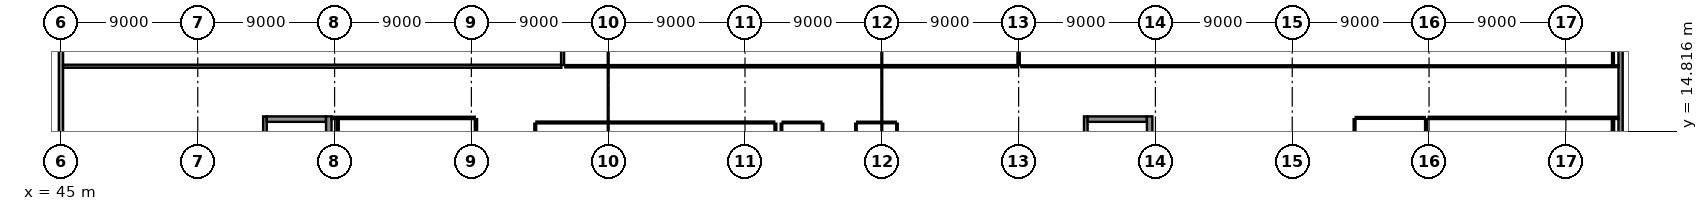
"""IFC4 building model, lengths in metres.
Left out: names, types, materials, properties, quantities, classifications, styles, units other than length and angle.
Written with IfcOpenShell. Run it as: python <this file> out.ifc"""

import sys

from ifc_helpers import new_model, si_unit, direction, frame, frame_2d, origin, place, context, subcontext, project, spatial, rectangle, extrude, element, fill, save


model = new_model("IFC4")
c1 = context("Model", 3, precision=1e-05, world=origin(), true_north=direction((0.0, 1.0)))
c2 = subcontext(c1, "Body", "Model", "MODEL_VIEW")
j1 = project(units=[si_unit("LENGTHUNIT", "METRE"), si_unit("PLANEANGLEUNIT", "RADIAN")], contexts=[c1])
p1 = place(None, origin())
s1 = spatial("IfcSite", under=j1, at=p1, CompositionType="ELEMENT")
p2 = place(p1, origin())
s2 = spatial("IfcBuilding", under=s1, at=p2, CompositionType="ELEMENT")
p3 = place(p2, frame((0.0, 0.0, 23.4)))
s3 = spatial("IfcBuildingStorey", under=s2, at=p3, CompositionType="ELEMENT", Elevation=23.4)
p4 = place(p3, frame((45.0, 23.677, 0.0), z_axis=(0.0, 0.0, 1.0), x_axis=(0.0, -1.0, 0.0)))
e1 = element("IfcWall", 1, at=p4, inside=s3, PredefinedType="SOLIDWALL", context=c2, shape_type="SweptSolid", body=[
    extrude(rectangle(XDim=11.529, YDim=0.28, at=frame_2d((5.765, 0.0))), origin(), (0.0, 0.0, 1.0), 3.155),
])
p5 = place(p4, frame((2.809, 0.0, 0.9)))
e2 = element("IfcOpeningElement", 2, at=p5, cuts=e1, PredefinedType="OPENING", context=c2, shape_type="SweptSolid", body=[
    extrude(rectangle(XDim=1.3, YDim=1.3, at=frame_2d((0.65, 0.65))), frame((0.0, 0.155, 0.0), z_axis=(0.0, -1.0, 0.0), x_axis=(1.0, 0.0, 0.0)), (0.0, 0.0, 1.0), 0.31),
])
p6 = place(p4, frame((8.117, 0.0, 0.9)))
e3 = element("IfcOpeningElement", 3, at=p6, cuts=e1, PredefinedType="OPENING", context=c2, shape_type="SweptSolid", body=[
    extrude(rectangle(XDim=1.3, YDim=1.3, at=frame_2d((0.65, 0.65))), frame((0.0, 0.155, 0.0), z_axis=(0.0, -1.0, 0.0), x_axis=(1.0, 0.0, 0.0)), (0.0, 0.0, 1.0), 0.31),
])
p7 = place(p3, frame((147.6, 11.99, 0.0), z_axis=(0.0, 0.0, 1.0), x_axis=(0.0, 1.0, 0.0)))
e4 = element("IfcWall", 4, at=p7, inside=s3, PredefinedType="SOLIDWALL", context=c2, shape_type="SweptSolid", body=[
    extrude(rectangle(XDim=12.05, YDim=0.28, at=frame_2d((6.025, 0.0))), origin(), (0.0, 0.0, 1.0), 3.055),
])
p8 = place(p7, frame((2.17, 0.0, 0.9)))
e5 = element("IfcOpeningElement", 5, at=p8, cuts=e4, PredefinedType="OPENING", context=c2, shape_type="SweptSolid", body=[
    extrude(rectangle(XDim=1.3, YDim=1.3, at=frame_2d((0.65, 0.65))), frame((0.0, 0.155, 0.0), z_axis=(0.0, -1.0, 0.0), x_axis=(1.0, 0.0, 0.0)), (0.0, 0.0, 1.0), 0.31),
])
p9 = place(p7, frame((7.785, 0.0, 0.9)))
e6 = element("IfcOpeningElement", 6, at=p9, cuts=e4, PredefinedType="OPENING", context=c2, shape_type="SweptSolid", body=[
    extrude(rectangle(XDim=1.3, YDim=1.3, at=frame_2d((0.65, 0.65))), frame((0.0, 0.155, 0.0), z_axis=(0.0, -1.0, 0.0), x_axis=(1.0, 0.0, 0.0)), (0.0, 0.0, 1.0), 0.31),
])
p10 = place(p3, frame((58.42, 13.04, 0.0), z_axis=(0.0, 0.0, 1.0), x_axis=(0.0, 1.0, 0.0)))
e7 = element("IfcWall", 7, at=p10, inside=s3, PredefinedType="SHEAR", context=c2, shape_type="SweptSolid", body=[
    extrude(rectangle(XDim=2.76, YDim=0.24, at=frame_2d((1.38, 0.0))), origin(), (0.0, 0.0, 1.0), 3.66),
])
p11 = place(p3, frame((58.54, 15.62, 0.0), z_axis=(0.0, 0.0, 1.0), x_axis=(1.0, 0.0, 0.0)))
e8 = element("IfcWall", 8, at=p11, inside=s3, PredefinedType="SHEAR", context=c2, shape_type="SweptSolid", body=[
    extrude(rectangle(XDim=3.9, YDim=0.36, at=frame_2d((1.95, 0.0))), origin(), (0.0, 0.0, 1.0), 3.66),
])
p12 = place(p11, frame((1.15, 0.0, 0.0)))
e9 = element("IfcOpeningElement", 9, at=p12, cuts=e8, PredefinedType="OPENING", context=c2, shape_type="SweptSolid", body=[
    extrude(rectangle(XDim=1.6, YDim=2.25, at=frame_2d((0.8, 1.125))), frame((0.0, 0.195, 0.0), z_axis=(0.0, -1.0, 0.0), x_axis=(1.0, 0.0, 0.0)), (0.0, 0.0, 1.0), 0.39),
])
p13 = place(p3, frame((62.62, 6.76, 0.0), z_axis=(0.0, 0.0, 1.0), x_axis=(0.0, 1.0, 0.0)))
e10 = element("IfcWall", 10, at=p13, inside=s3, PredefinedType="SHEAR", context=c2, shape_type="SweptSolid", body=[
    extrude(rectangle(XDim=9.04, YDim=0.36, at=frame_2d((4.52, 0.0))), origin(), (0.0, 0.0, 1.0), 3.66),
])
p14 = place(p3, frame((112.42, 13.04, 0.0), z_axis=(0.0, 0.0, 1.0), x_axis=(0.0, 1.0, 0.0)))
e11 = element("IfcWall", 11, at=p14, inside=s3, PredefinedType="SHEAR", context=c2, shape_type="SweptSolid", body=[
    extrude(rectangle(XDim=2.76, YDim=0.24, at=frame_2d((1.38, 0.0))), origin(), (0.0, 0.0, 1.0), 3.66),
])
p15 = place(p3, frame((112.54, 15.62, 0.0), z_axis=(0.0, 0.0, 1.0), x_axis=(1.0, 0.0, 0.0)))
e12 = element("IfcWall", 12, at=p15, inside=s3, PredefinedType="SHEAR", context=c2, shape_type="SweptSolid", body=[
    extrude(rectangle(XDim=3.9, YDim=0.36, at=frame_2d((1.95, 0.0))), origin(), (0.0, 0.0, 1.0), 3.66),
])
p16 = place(p15, frame((1.15, 0.0, 0.0)))
e13 = element("IfcOpeningElement", 13, at=p16, cuts=e12, PredefinedType="OPENING", context=c2, shape_type="SweptSolid", body=[
    extrude(rectangle(XDim=1.6, YDim=2.25, at=frame_2d((0.8, 1.125))), frame((0.0, 0.195, 0.0), z_axis=(0.0, -1.0, 0.0), x_axis=(1.0, 0.0, 0.0)), (0.0, 0.0, 1.0), 0.39),
])
p17 = place(p3, frame((116.62, 6.76, 0.0), z_axis=(0.0, 0.0, 1.0), x_axis=(0.0, 1.0, 0.0)))
e14 = element("IfcWall", 14, at=p17, inside=s3, PredefinedType="SHEAR", context=c2, shape_type="SweptSolid", body=[
    extrude(rectangle(XDim=9.04, YDim=0.36, at=frame_2d((4.52, 0.0))), origin(), (0.0, 0.0, 1.0), 3.66),
])
p18 = place(p3, frame((63.2, 12.57, 0.0), z_axis=(0.0, 0.0, 1.0), x_axis=(0.0, 1.0, 0.0)))
e15 = element("IfcWall", 15, at=p18, inside=s3, PredefinedType="PARTITIONING", context=c2, shape_type="SweptSolid", body=[
    extrude(rectangle(XDim=3.05, YDim=0.15, at=frame_2d((1.525, 0.0))), origin(), (0.0, 0.0, 1.0), 3.365),
])
p19 = place(p3, frame((62.795, 15.7, 0.0), z_axis=(0.0, 0.0, 1.0), x_axis=(1.0, 0.0, 0.0)))
e16 = element("IfcWall", 16, at=p19, inside=s3, PredefinedType="PARTITIONING", context=c2, shape_type="SweptSolid", body=[
    extrude(rectangle(XDim=9.425, YDim=0.15, at=frame_2d((4.712, 0.0))), origin(), (0.0, 0.0, 1.0), 3.64),
])
p20 = place(p19, frame((4.187, 0.0, 0.0)))
e17 = element("IfcOpeningElement", 17, at=p20, cuts=e16, PredefinedType="OPENING", context=c2, shape_type="SweptSolid", body=[
    extrude(rectangle(XDim=1.05, YDim=2.25, at=frame_2d((0.525, 1.125))), frame((0.0, 0.09, 0.0), z_axis=(0.0, -1.0, 0.0), x_axis=(1.0, 0.0, 0.0)), (0.0, 0.0, 1.0), 0.18),
])
p21 = place(p3, frame((72.3, 15.62, 0.0), z_axis=(0.0, 0.0, 1.0), x_axis=(0.0, -1.0, 0.0)))
e18 = element("IfcWall", 18, at=p21, inside=s3, PredefinedType="PARTITIONING", context=c2, shape_type="SweptSolid", body=[
    extrude(rectangle(XDim=3.04, YDim=0.15, at=frame_2d((1.52, 0.0))), origin(), (0.0, 0.0, 1.0), 3.64),
])
p22 = place(p3, frame((78.0, 23.865, 0.0), z_axis=(0.0, 0.0, 1.0), x_axis=(0.0, -1.0, 0.0)))
e19 = element("IfcWall", 19, at=p22, inside=s3, PredefinedType="PARTITIONING", context=c2, shape_type="SweptSolid", body=[
    extrude(rectangle(XDim=4.685, YDim=0.2, at=frame_2d((2.343, 0.0))), origin(), (0.0, 0.0, 1.0), 3.555),
])
p23 = place(p3, frame((77.92, 19.1, 0.0), z_axis=(0.0, 0.0, 1.0), x_axis=(-1.0, 0.0, 0.0)))
e20 = element("IfcWall", 20, at=p23, inside=s3, PredefinedType="PARTITIONING", context=c2, shape_type="SweptSolid", body=[
    extrude(rectangle(XDim=32.785, YDim=0.2, at=frame_2d((16.393, 0.0))), origin(), (0.0, 0.0, 1.0), 3.64),
])
p24 = place(p23, frame((15.442, 0.0, 0.0)))
e21 = element("IfcOpeningElement", 21, at=p24, cuts=e20, PredefinedType="OPENING", context=c2, shape_type="SweptSolid", body=[
    extrude(rectangle(XDim=1.9, YDim=2.5, at=frame_2d((0.95, 1.25))), frame((0.0, 0.115, 0.0), z_axis=(0.0, -1.0, 0.0), x_axis=(1.0, 0.0, 0.0)), (0.0, 0.0, 1.0), 0.23),
])
p25 = place(p3, frame((108.0, 23.52, 0.0), z_axis=(0.0, 0.0, 1.0), x_axis=(0.0, -1.0, 0.0)))
e22 = element("IfcWall", 22, at=p25, inside=s3, PredefinedType="PARTITIONING", context=c2, shape_type="SweptSolid", body=[
    extrude(rectangle(XDim=4.34, YDim=0.15, at=frame_2d((2.17, 0.0))), origin(), (0.0, 0.0, 1.0), 3.405),
])
p26 = place(p3, frame((107.92, 19.1, 0.0), z_axis=(0.0, 0.0, 1.0), x_axis=(-1.0, 0.0, 0.0)))
e23 = element("IfcWall", 23, at=p26, inside=s3, PredefinedType="PARTITIONING", context=c2, shape_type="SweptSolid", body=[
    extrude(rectangle(XDim=29.74, YDim=0.15, at=frame_2d((14.87, 0.0))), origin(), (0.0, 0.0, 1.0), 3.64),
])
p27 = place(p26, frame((14.345, 0.0, 0.0)))
e24 = element("IfcOpeningElement", 24, at=p27, cuts=e23, PredefinedType="OPENING", context=c2, shape_type="SweptSolid", body=[
    extrude(rectangle(XDim=1.05, YDim=2.25, at=frame_2d((0.525, 1.125))), frame((0.0, 0.09, 0.0), z_axis=(0.0, -1.0, 0.0), x_axis=(1.0, 0.0, 0.0)), (0.0, 0.0, 1.0), 0.18),
])
p28 = place(p3, frame((147.465, 19.1, 0.0), z_axis=(0.0, 0.0, 1.0), x_axis=(-1.0, 0.0, 0.0)))
e25 = element("IfcWall", 25, at=p28, inside=s3, PredefinedType="PARTITIONING", context=c2, shape_type="SweptSolid", body=[
    extrude(rectangle(XDim=39.285, YDim=0.12, at=frame_2d((19.643, 0.0))), origin(), (0.0, 0.0, 1.0), 3.64),
])
p29 = place(p28, frame((19.192, 0.0, 0.0)))
e26 = element("IfcOpeningElement", 26, at=p29, cuts=e25, PredefinedType="OPENING", context=c2, shape_type="SweptSolid", body=[
    extrude(rectangle(XDim=0.9, YDim=2.1, at=frame_2d((0.45, 1.05))), frame((0.0, 0.075, 0.0), z_axis=(0.0, -1.0, 0.0), x_axis=(1.0, 0.0, 0.0)), (0.0, 0.0, 1.0), 0.15),
])
p30 = place(p3, frame((147.1, 23.545, 0.0), z_axis=(0.0, 0.0, 1.0), x_axis=(0.0, -1.0, 0.0)))
e27 = element("IfcWall", 27, at=p30, inside=s3, PredefinedType="PARTITIONING", context=c2, shape_type="SweptSolid", body=[
    extrude(rectangle(XDim=4.39, YDim=0.12, at=frame_2d((2.195, 0.0))), origin(), (0.0, 0.0, 1.0), 3.64),
])
p31 = place(p3, frame((134.8, 15.62, 0.0), z_axis=(0.0, 0.0, 1.0), x_axis=(0.0, -1.0, 0.0)))
e28 = element("IfcWall", 28, at=p31, inside=s3, PredefinedType="PARTITIONING", context=c2, shape_type="SweptSolid", body=[
    extrude(rectangle(XDim=3.94, YDim=0.12, at=frame_2d((1.97, 0.0))), origin(), (0.0, 0.0, 1.0), 3.285),
])
p32 = place(p3, frame((130.1, 11.68, 0.0), z_axis=(0.0, 0.0, 1.0), x_axis=(0.0, 1.0, 0.0)))
e29 = element("IfcWall", 29, at=p32, inside=s3, PredefinedType="PARTITIONING", context=c2, shape_type="SweptSolid", body=[
    extrude(rectangle(XDim=3.94, YDim=0.12, at=frame_2d((1.97, 0.0))), origin(), (0.0, 0.0, 1.0), 3.64),
])
p33 = place(p3, frame((130.18, 15.7, 0.0), z_axis=(0.0, 0.0, 1.0), x_axis=(1.0, 0.0, 0.0)))
e30 = element("IfcWall", 30, at=p33, inside=s3, PredefinedType="PARTITIONING", context=c2, shape_type="SweptSolid", body=[
    extrude(rectangle(XDim=4.54, YDim=0.12, at=frame_2d((2.27, 0.0))), origin(), (0.0, 0.0, 1.0), 3.64),
])
p34 = place(p33, frame((1.795, 0.0, 0.0)))
e31 = element("IfcOpeningElement", 31, at=p34, cuts=e30, PredefinedType="OPENING", context=c2, shape_type="SweptSolid", body=[
    extrude(rectangle(XDim=0.95, YDim=2.15, at=frame_2d((0.475, 1.075))), frame((0.0, 0.075, 0.0), z_axis=(0.0, -1.0, 0.0), x_axis=(1.0, 0.0, 0.0)), (0.0, 0.0, 1.0), 0.15),
])
p35 = place(p3, frame((134.98, 15.7, 0.0), z_axis=(0.0, 0.0, 1.0), x_axis=(1.0, 0.0, 0.0)))
e32 = element("IfcWall", 32, at=p35, inside=s3, PredefinedType="PARTITIONING", context=c2, shape_type="SweptSolid", body=[
    extrude(rectangle(XDim=12.485, YDim=0.15, at=frame_2d((6.243, 0.0))), origin(), (0.0, 0.0, 1.0), 3.64),
])
p36 = place(p35, frame((5.718, 0.0, 0.0)))
e33 = element("IfcOpeningElement", 33, at=p36, cuts=e32, PredefinedType="OPENING", context=c2, shape_type="SweptSolid", body=[
    extrude(rectangle(XDim=1.05, YDim=2.25, at=frame_2d((0.525, 1.125))), frame((0.0, 0.09, 0.0), z_axis=(0.0, -1.0, 0.0), x_axis=(1.0, 0.0, 0.0)), (0.0, 0.0, 1.0), 0.18),
])
p37 = place(p3, frame((147.1, 15.63, 0.0), z_axis=(0.0, 0.0, 1.0), x_axis=(0.0, -1.0, 0.0)))
e34 = element("IfcWall", 34, at=p37, inside=s3, PredefinedType="PARTITIONING", context=c2, shape_type="SweptSolid", body=[
    extrude(rectangle(XDim=15.495, YDim=0.15, at=frame_2d((7.748, 0.0))), origin(), (0.0, 0.0, 1.0), 3.64),
])
for number, where, z_axis, x_axis in (
    (35, (92.0, 15.32, 0.0), (0.0, 0.0, 1.0), (0.0, -1.0, 0.0)),
    (36, (76.2, 3.655, 0.0), (0.0, 0.0, 1.0), (0.0, 1.0, 0.0)),
):
    element("IfcWall", number, at=place(p3, frame(where, z_axis=z_axis, x_axis=x_axis)), inside=s3, PredefinedType="PARTITIONING", context=c2, shape_type="SweptSolid", body=[
        extrude(rectangle(XDim=11.665, YDim=0.12, at=frame_2d((5.833, 0.0))), origin(), (0.0, 0.0, 1.0), 3.64),
    ])
p38 = place(p3, frame((76.28, 15.4, 0.0), z_axis=(0.0, 0.0, 1.0), x_axis=(1.0, 0.0, 0.0)))
e37 = element("IfcWall", 37, at=p38, inside=s3, PredefinedType="PARTITIONING", context=c2, shape_type="SweptSolid", body=[
    extrude(rectangle(XDim=15.64, YDim=0.12, at=frame_2d((7.82, 0.0))), origin(), (0.0, 0.0, 1.0), 3.64),
])
p39 = place(p38, frame((7.37, 0.0, 0.0)))
e38 = element("IfcOpeningElement", 38, at=p39, cuts=e37, PredefinedType="OPENING", context=c2, shape_type="SweptSolid", body=[
    extrude(rectangle(XDim=0.9, YDim=2.1, at=frame_2d((0.45, 1.05))), frame((0.0, 0.075, 0.0), z_axis=(0.0, -1.0, 0.0), x_axis=(1.0, 0.0, 0.0)), (0.0, 0.0, 1.0), 0.15),
])
p40 = place(p3, frame((92.48, 15.4, 0.0), z_axis=(0.0, 0.0, 1.0), x_axis=(1.0, 0.0, 0.0)))
e39 = element("IfcWall", 39, at=p40, inside=s3, PredefinedType="PARTITIONING", context=c2, shape_type="SweptSolid", body=[
    extrude(rectangle(XDim=2.54, YDim=0.1, at=frame_2d((1.27, 0.0))), origin(), (0.0, 0.0, 1.0), 3.64),
])
p41 = place(p3, frame((95.1, 15.32, 0.0), z_axis=(0.0, 0.0, 1.0), x_axis=(0.0, -1.0, 0.0)))
e40 = element("IfcWall", 40, at=p41, inside=s3, PredefinedType="PARTITIONING", context=c2, shape_type="SweptSolid", body=[
    extrude(rectangle(XDim=5.34, YDim=0.1, at=frame_2d((2.67, 0.0))), origin(), (0.0, 0.0, 1.0), 3.64),
])
p42 = place(p41, frame((2.22, 0.0, 0.0)))
e41 = element("IfcOpeningElement", 41, at=p42, cuts=e40, PredefinedType="OPENING", context=c2, shape_type="SweptSolid", body=[
    extrude(rectangle(XDim=0.9, YDim=2.05, at=frame_2d((0.45, 1.025))), frame((0.0, 0.065, 0.0), z_axis=(0.0, -1.0, 0.0), x_axis=(1.0, 0.0, 0.0)), (0.0, 0.0, 1.0), 0.13),
])
p43 = place(p3, frame((92.4, 9.845, 0.0), z_axis=(0.0, 0.0, 1.0), x_axis=(0.0, 1.0, 0.0)))
e42 = element("IfcWall", 42, at=p43, inside=s3, PredefinedType="PARTITIONING", context=c2, shape_type="SweptSolid", body=[
    extrude(rectangle(XDim=5.475, YDim=0.1, at=frame_2d((2.738, 0.0))), origin(), (0.0, 0.0, 1.0), 3.64),
])
p44 = place(p3, frame((100.0, 15.32, 0.0), z_axis=(0.0, 0.0, 1.0), x_axis=(0.0, -1.0, 0.0)))
e43 = element("IfcWall", 43, at=p44, inside=s3, PredefinedType="PARTITIONING", context=c2, shape_type="SweptSolid", body=[
    extrude(rectangle(XDim=5.44, YDim=0.1, at=frame_2d((2.72, 0.0))), origin(), (0.0, 0.0, 1.0), 3.64),
])
p45 = place(p3, frame((97.3, 9.88, 0.0), z_axis=(0.0, 0.0, 1.0), x_axis=(0.0, 1.0, 0.0)))
e44 = element("IfcWall", 44, at=p45, inside=s3, PredefinedType="PARTITIONING", context=c2, shape_type="SweptSolid", body=[
    extrude(rectangle(XDim=5.44, YDim=0.1, at=frame_2d((2.72, 0.0))), origin(), (0.0, 0.0, 1.0), 3.64),
])
p46 = place(p45, frame((2.22, 0.0, 0.0)))
e45 = element("IfcOpeningElement", 45, at=p46, cuts=e44, PredefinedType="OPENING", context=c2, shape_type="SweptSolid", body=[
    extrude(rectangle(XDim=1.0, YDim=2.1, at=frame_2d((0.5, 1.05))), frame((0.0, 0.065, 0.0), z_axis=(0.0, -1.0, 0.0), x_axis=(1.0, 0.0, 0.0)), (0.0, 0.0, 1.0), 0.13),
])
p47 = place(p3, frame((97.38, 15.4, 0.0), z_axis=(0.0, 0.0, 1.0), x_axis=(1.0, 0.0, 0.0)))
e46 = element("IfcWall", 46, at=p47, inside=s3, PredefinedType="PARTITIONING", context=c2, shape_type="SweptSolid", body=[
    extrude(rectangle(XDim=2.54, YDim=0.1, at=frame_2d((1.27, 0.0))), origin(), (0.0, 0.0, 1.0), 3.64),
])
p48 = place(p5, origin())
e47 = element("IfcWindow", 47, at=p48, inside=s3, PartitioningType="SINGLE_PANEL", PredefinedType="WINDOW", context=c2, shape_type="SweptSolid", body=[
    extrude(rectangle(XDim=1.3, YDim=1.3, at=frame_2d((0.65, 0.65))), frame((0.0, 0.03, 0.0), z_axis=(0.0, -1.0, 0.0), x_axis=(1.0, 0.0, 0.0)), (0.0, 0.0, 1.0), 0.06),
])
fill(e2, e47)
p49 = place(p6, origin())
e48 = element("IfcWindow", 48, at=p49, inside=s3, PartitioningType="SINGLE_PANEL", PredefinedType="WINDOW", context=c2, shape_type="SweptSolid", body=[
    extrude(rectangle(XDim=1.3, YDim=1.3, at=frame_2d((0.65, 0.65))), frame((0.0, 0.03, 0.0), z_axis=(0.0, -1.0, 0.0), x_axis=(1.0, 0.0, 0.0)), (0.0, 0.0, 1.0), 0.06),
])
fill(e3, e48)
p50 = place(p8, origin())
e49 = element("IfcWindow", 49, at=p50, inside=s3, PartitioningType="SINGLE_PANEL", PredefinedType="WINDOW", context=c2, shape_type="SweptSolid", body=[
    extrude(rectangle(XDim=1.3, YDim=1.3, at=frame_2d((0.65, 0.65))), frame((0.0, 0.03, 0.0), z_axis=(0.0, -1.0, 0.0), x_axis=(1.0, 0.0, 0.0)), (0.0, 0.0, 1.0), 0.06),
])
fill(e5, e49)
p51 = place(p9, origin())
e50 = element("IfcWindow", 50, at=p51, inside=s3, PartitioningType="SINGLE_PANEL", PredefinedType="WINDOW", context=c2, shape_type="SweptSolid", body=[
    extrude(rectangle(XDim=1.3, YDim=1.3, at=frame_2d((0.65, 0.65))), frame((0.0, 0.03, 0.0), z_axis=(0.0, -1.0, 0.0), x_axis=(1.0, 0.0, 0.0)), (0.0, 0.0, 1.0), 0.06),
])
fill(e6, e50)
p52 = place(p12, origin())
e51 = element("IfcDoor", 51, at=p52, inside=s3, OperationType="DOUBLE_DOOR_SINGLE_SWING", PredefinedType="DOOR", context=c2, shape_type="SweptSolid", body=[
    extrude(rectangle(XDim=1.6, YDim=2.25, at=frame_2d((0.8, 1.125))), frame((0.0, 0.025, 0.0), z_axis=(0.0, -1.0, 0.0), x_axis=(1.0, 0.0, 0.0)), (0.0, 0.0, 1.0), 0.05),
])
fill(e9, e51)
p53 = place(p16, origin())
e52 = element("IfcDoor", 52, at=p53, inside=s3, OperationType="DOUBLE_DOOR_SINGLE_SWING", PredefinedType="DOOR", context=c2, shape_type="SweptSolid", body=[
    extrude(rectangle(XDim=1.6, YDim=2.25, at=frame_2d((0.8, 1.125))), frame((0.0, 0.025, 0.0), z_axis=(0.0, -1.0, 0.0), x_axis=(1.0, 0.0, 0.0)), (0.0, 0.0, 1.0), 0.05),
])
fill(e13, e52)
p54 = place(p20, frame((1.05, 0.0, 0.0), z_axis=(0.0, 0.0, 1.0), x_axis=(-1.0, 0.0, 0.0)))
e53 = element("IfcDoor", 53, at=p54, inside=s3, OperationType="SINGLE_SWING_RIGHT", PredefinedType="DOOR", context=c2, shape_type="SweptSolid", body=[
    extrude(rectangle(XDim=1.05, YDim=2.25, at=frame_2d((0.525, 1.125))), frame((0.0, 0.025, 0.0), z_axis=(0.0, -1.0, 0.0), x_axis=(1.0, 0.0, 0.0)), (0.0, 0.0, 1.0), 0.05),
])
fill(e17, e53)
p55 = place(p24, origin())
e54 = element("IfcDoor", 54, at=p55, inside=s3, OperationType="DOUBLE_DOOR_SINGLE_SWING", PredefinedType="DOOR", context=c2, shape_type="SweptSolid", body=[
    extrude(rectangle(XDim=1.9, YDim=2.5, at=frame_2d((0.95, 1.25))), frame((0.0, 0.025, 0.0), z_axis=(0.0, -1.0, 0.0), x_axis=(1.0, 0.0, 0.0)), (0.0, 0.0, 1.0), 0.05),
])
fill(e21, e54)
p56 = place(p27, frame((1.05, 0.0, 0.0), z_axis=(0.0, 0.0, 1.0), x_axis=(-1.0, 0.0, 0.0)))
e55 = element("IfcDoor", 55, at=p56, inside=s3, OperationType="SINGLE_SWING_LEFT", PredefinedType="DOOR", context=c2, shape_type="SweptSolid", body=[
    extrude(rectangle(XDim=1.05, YDim=2.25, at=frame_2d((0.525, 1.125))), frame((0.0, 0.025, 0.0), z_axis=(0.0, -1.0, 0.0), x_axis=(1.0, 0.0, 0.0)), (0.0, 0.0, 1.0), 0.05),
])
fill(e24, e55)
p57 = place(p29, origin())
e56 = element("IfcDoor", 56, at=p57, inside=s3, OperationType="SINGLE_SWING_RIGHT", PredefinedType="DOOR", context=c2, shape_type="SweptSolid", body=[
    extrude(rectangle(XDim=0.9, YDim=2.1, at=frame_2d((0.45, 1.05))), frame((0.0, 0.025, 0.0), z_axis=(0.0, -1.0, 0.0), x_axis=(1.0, 0.0, 0.0)), (0.0, 0.0, 1.0), 0.05),
])
fill(e26, e56)
p58 = place(p34, origin())
e57 = element("IfcDoor", 57, at=p58, inside=s3, OperationType="SINGLE_SWING_RIGHT", PredefinedType="DOOR", context=c2, shape_type="SweptSolid", body=[
    extrude(rectangle(XDim=0.95, YDim=2.15, at=frame_2d((0.475, 1.075))), frame((0.0, 0.025, 0.0), z_axis=(0.0, -1.0, 0.0), x_axis=(1.0, 0.0, 0.0)), (0.0, 0.0, 1.0), 0.05),
])
fill(e31, e57)
p59 = place(p36, frame((1.05, 0.0, 0.0), z_axis=(0.0, 0.0, 1.0), x_axis=(-1.0, 0.0, 0.0)))
e58 = element("IfcDoor", 58, at=p59, inside=s3, OperationType="SINGLE_SWING_LEFT", PredefinedType="DOOR", context=c2, shape_type="SweptSolid", body=[
    extrude(rectangle(XDim=1.05, YDim=2.25, at=frame_2d((0.525, 1.125))), frame((0.0, 0.025, 0.0), z_axis=(0.0, -1.0, 0.0), x_axis=(1.0, 0.0, 0.0)), (0.0, 0.0, 1.0), 0.05),
])
fill(e33, e58)
p60 = place(p39, origin())
e59 = element("IfcDoor", 59, at=p60, inside=s3, OperationType="SINGLE_SWING_RIGHT", PredefinedType="DOOR", context=c2, shape_type="SweptSolid", body=[
    extrude(rectangle(XDim=0.9, YDim=2.1, at=frame_2d((0.45, 1.05))), frame((0.0, 0.025, 0.0), z_axis=(0.0, -1.0, 0.0), x_axis=(1.0, 0.0, 0.0)), (0.0, 0.0, 1.0), 0.05),
])
fill(e38, e59)
save(model, sys.argv[1])
